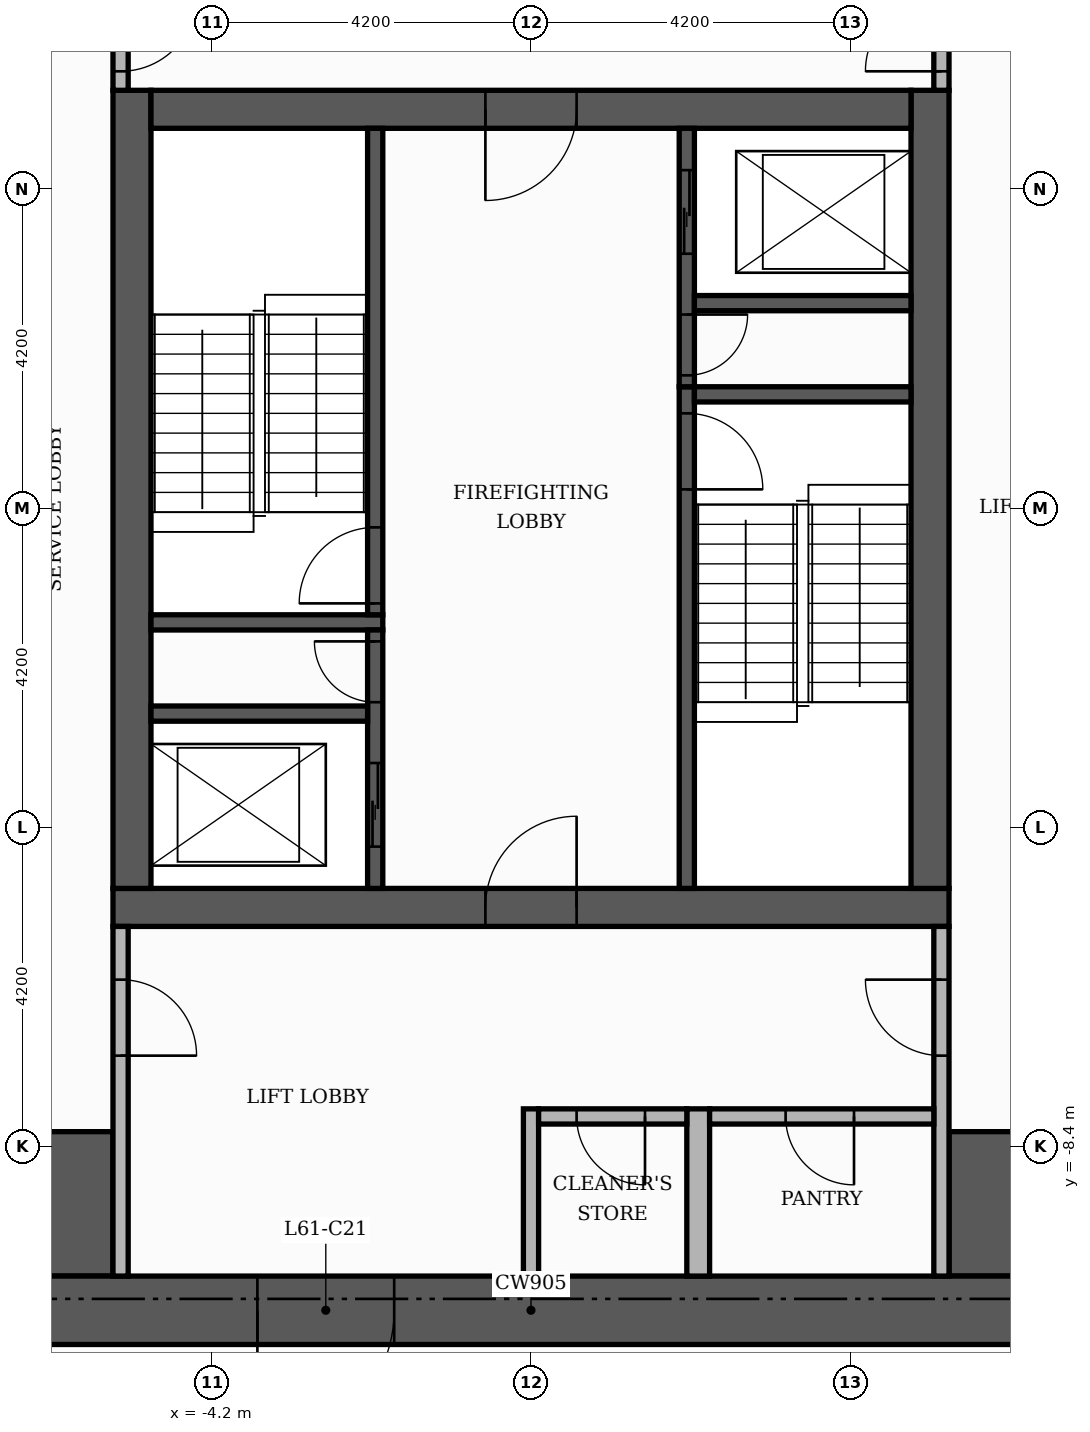
"""IFC4 building model, lengths in metres.
Left out: names, types, materials, properties, quantities, classifications, styles, units other than length and angle.
Written with IfcOpenShell. Run it as: python <this file> out.ifc"""

import sys

from ifc_helpers import new_model, si_unit, direction, frame, frame_2d, origin, place, context, subcontext, project, spatial, rectangle, extrude, element, fill, save


model = new_model("IFC4")
c1 = context("Model", 3, precision=1e-05, world=origin(), true_north=direction((0.0, 1.0)))
c2 = subcontext(c1, "Body", "Model", "MODEL_VIEW")
j1 = project(units=[si_unit("LENGTHUNIT", "METRE"), si_unit("PLANEANGLEUNIT", "RADIAN")], contexts=[c1])
p1 = place(None, origin())
s1 = spatial("IfcSite", under=j1, at=p1, CompositionType="ELEMENT")
p2 = place(p1, origin())
s2 = spatial("IfcBuilding", under=s1, at=p2, CompositionType="ELEMENT")
p3 = place(p2, frame((0.0, 0.0, 256.2)))
s3 = spatial("IfcBuildingStorey", under=s2, at=p3, CompositionType="ELEMENT", Elevation=256.2)
p4 = place(p3, frame((-5.5, -5.25, 0.0), z_axis=(0.0, 0.0, 1.0), x_axis=(1.0, 0.0, 0.0)))
e1 = element("IfcWall", 1, at=p4, inside=s3, PredefinedType="SHEAR", context=c2, shape_type="SweptSolid", body=[
    extrude(rectangle(XDim=11.0, YDim=0.5, at=frame_2d((5.5, 0.0))), origin(), (0.0, 0.0, 1.0), 3.48),
])
p5 = place(p4, frame((4.9, 0.0, 0.0)))
e2 = element("IfcOpeningElement", 2, at=p5, cuts=e1, PredefinedType="OPENING", context=c2, shape_type="SweptSolid", body=[
    extrude(rectangle(XDim=1.2, YDim=2.1, at=frame_2d((0.6, 1.05))), frame((0.0, 0.26, 0.0), z_axis=(0.0, -1.0, 0.0), x_axis=(1.0, 0.0, 0.0)), (0.0, 0.0, 1.0), 0.52),
])
for number, where, z_axis, x_axis in (
    (3, (-5.25, -5.0, 0.0), (0.0, 0.0, 1.0), (0.0, 1.0, 0.0)),
    (4, (5.25, -5.0, 0.0), (0.0, 0.0, 1.0), (0.0, 1.0, 0.0)),
):
    element("IfcWall", number, at=place(p3, frame(where, z_axis=z_axis, x_axis=x_axis)), inside=s3, PredefinedType="SHEAR", context=c2, shape_type="SweptSolid", body=[
        extrude(rectangle(XDim=10.5, YDim=0.5, at=frame_2d((5.25, 0.0))), origin(), (0.0, 0.0, 1.0), 3.48),
    ])
p6 = place(p3, frame((-5.0, 5.25, 0.0), z_axis=(0.0, 0.0, 1.0), x_axis=(1.0, 0.0, 0.0)))
e5 = element("IfcWall", 5, at=p6, inside=s3, PredefinedType="SHEAR", context=c2, shape_type="SweptSolid", body=[
    extrude(rectangle(XDim=10.0, YDim=0.5, at=frame_2d((5.0, 0.0))), origin(), (0.0, 0.0, 1.0), 3.48),
])
p7 = place(p6, frame((4.4, 0.0, 0.0)))
e6 = element("IfcOpeningElement", 6, at=p7, cuts=e5, PredefinedType="OPENING", context=c2, shape_type="SweptSolid", body=[
    extrude(rectangle(XDim=1.2, YDim=2.1, at=frame_2d((0.6, 1.05))), frame((0.0, 0.26, 0.0), z_axis=(0.0, -1.0, 0.0), x_axis=(1.0, 0.0, 0.0)), (0.0, 0.0, 1.0), 0.52),
])
for number, where, z_axis, x_axis in (
    (7, (-10.1, -9.15, 0.0), (0.0, 0.0, 1.0), (1.0, 0.0, 0.0)),
    (8, (5.5, -9.15, 0.0), (0.0, 0.0, 1.0), (1.0, 0.0, 0.0)),
):
    element("IfcWall", number, at=place(p3, frame(where, z_axis=z_axis, x_axis=x_axis)), inside=s3, PredefinedType="SHEAR", context=c2, shape_type="SweptSolid", body=[
        extrude(rectangle(XDim=4.6, YDim=1.9, at=frame_2d((2.3, 0.0))), origin(), (0.0, 0.0, 1.0), 3.48),
    ])
p8 = place(p3, frame((2.05, -5.0, 0.0), z_axis=(0.0, 0.0, 1.0), x_axis=(0.0, 1.0, 0.0)))
e9 = element("IfcWall", 9, at=p8, inside=s3, PredefinedType="SHEAR", context=c2, shape_type="SweptSolid", body=[
    extrude(rectangle(XDim=6.6, YDim=0.2, at=frame_2d((3.3, 0.0))), origin(), (0.0, 0.0, 1.0), 3.48),
])
p9 = place(p8, frame((5.25, 0.0, 0.0)))
e10 = element("IfcOpeningElement", 10, at=p9, cuts=e9, PredefinedType="OPENING", context=c2, shape_type="SweptSolid", body=[
    extrude(rectangle(XDim=1.0, YDim=2.1, at=frame_2d((0.5, 1.05))), frame((0.0, 0.11, 0.0), z_axis=(0.0, -1.0, 0.0), x_axis=(1.0, 0.0, 0.0)), (0.0, 0.0, 1.0), 0.22),
])
p10 = place(p3, frame((-5.0, -1.5, 0.0), z_axis=(0.0, 0.0, 1.0), x_axis=(1.0, 0.0, 0.0)))
e11 = element("IfcWall", 11, at=p10, inside=s3, PredefinedType="SHEAR", context=c2, shape_type="SweptSolid", body=[
    extrude(rectangle(XDim=3.05, YDim=0.2, at=frame_2d((1.525, 0.0))), origin(), (0.0, 0.0, 1.0), 3.48),
])
p11 = place(p3, frame((-2.05, -1.4, 0.0), z_axis=(0.0, 0.0, 1.0), x_axis=(0.0, 1.0, 0.0)))
e12 = element("IfcWall", 12, at=p11, inside=s3, PredefinedType="SHEAR", context=c2, shape_type="SweptSolid", body=[
    extrude(rectangle(XDim=6.4, YDim=0.2, at=frame_2d((3.2, 0.0))), origin(), (0.0, 0.0, 1.0), 3.48),
])
p12 = place(p11, frame((0.15, 0.0, 0.0)))
e13 = element("IfcOpeningElement", 13, at=p12, cuts=e12, PredefinedType="OPENING", context=c2, shape_type="SweptSolid", body=[
    extrude(rectangle(XDim=1.0, YDim=2.1, at=frame_2d((0.5, 1.05))), frame((0.0, 0.11, 0.0), z_axis=(0.0, -1.0, 0.0), x_axis=(1.0, 0.0, 0.0)), (0.0, 0.0, 1.0), 0.22),
])
p13 = place(p3, frame((2.15, 1.5, 0.0), z_axis=(0.0, 0.0, 1.0), x_axis=(1.0, 0.0, 0.0)))
e14 = element("IfcWall", 14, at=p13, inside=s3, PredefinedType="SHEAR", context=c2, shape_type="SweptSolid", body=[
    extrude(rectangle(XDim=2.85, YDim=0.2, at=frame_2d((1.425, 0.0))), origin(), (0.0, 0.0, 1.0), 3.48),
])
p14 = place(p3, frame((-2.05, -5.0, 0.0), z_axis=(0.0, 0.0, 1.0), x_axis=(0.0, 1.0, 0.0)))
e15 = element("IfcWall", 15, at=p14, inside=s3, PredefinedType="SHEAR", context=c2, shape_type="SweptSolid", body=[
    extrude(rectangle(XDim=3.4, YDim=0.2, at=frame_2d((1.7, 0.0))), origin(), (0.0, 0.0, 1.0), 3.48),
])
p15 = place(p14, frame((0.55, 0.0, 0.0)))
e16 = element("IfcOpeningElement", 16, at=p15, cuts=e15, PredefinedType="OPENING", context=c2, shape_type="SweptSolid", body=[
    extrude(rectangle(XDim=1.1, YDim=2.1, at=frame_2d((0.55, 1.05))), frame((0.0, 0.11, 0.0), z_axis=(0.0, -1.0, 0.0), x_axis=(1.0, 0.0, 0.0)), (0.0, 0.0, 1.0), 0.22),
])
p16 = place(p14, frame((2.45, 0.0, 0.0)))
e17 = element("IfcOpeningElement", 17, at=p16, cuts=e15, PredefinedType="OPENING", context=c2, shape_type="SweptSolid", body=[
    extrude(rectangle(XDim=0.8, YDim=2.1, at=frame_2d((0.4, 1.05))), frame((0.0, 0.11, 0.0), z_axis=(0.0, -1.0, 0.0), x_axis=(1.0, 0.0, 0.0)), (0.0, 0.0, 1.0), 0.22),
])
p17 = place(p3, frame((-5.0, -2.7, 0.0), z_axis=(0.0, 0.0, 1.0), x_axis=(1.0, 0.0, 0.0)))
e18 = element("IfcWall", 18, at=p17, inside=s3, PredefinedType="SHEAR", context=c2, shape_type="SweptSolid", body=[
    extrude(rectangle(XDim=2.85, YDim=0.2, at=frame_2d((1.425, 0.0))), origin(), (0.0, 0.0, 1.0), 3.48),
])
p18 = place(p3, frame((2.05, 1.6, 0.0), z_axis=(0.0, 0.0, 1.0), x_axis=(0.0, 1.0, 0.0)))
e19 = element("IfcWall", 19, at=p18, inside=s3, PredefinedType="SHEAR", context=c2, shape_type="SweptSolid", body=[
    extrude(rectangle(XDim=3.4, YDim=0.2, at=frame_2d((1.7, 0.0))), origin(), (0.0, 0.0, 1.0), 3.48),
])
p19 = place(p18, frame((1.75, 0.0, 0.0)))
e20 = element("IfcOpeningElement", 20, at=p19, cuts=e19, PredefinedType="OPENING", context=c2, shape_type="SweptSolid", body=[
    extrude(rectangle(XDim=1.1, YDim=2.1, at=frame_2d((0.55, 1.05))), frame((0.0, 0.11, 0.0), z_axis=(0.0, -1.0, 0.0), x_axis=(1.0, 0.0, 0.0)), (0.0, 0.0, 1.0), 0.22),
])
p20 = place(p18, frame((0.15, 0.0, 0.0)))
e21 = element("IfcOpeningElement", 21, at=p20, cuts=e19, PredefinedType="OPENING", context=c2, shape_type="SweptSolid", body=[
    extrude(rectangle(XDim=0.8, YDim=2.1, at=frame_2d((0.4, 1.05))), frame((0.0, 0.11, 0.0), z_axis=(0.0, -1.0, 0.0), x_axis=(1.0, 0.0, 0.0)), (0.0, 0.0, 1.0), 0.22),
])
p21 = place(p3, frame((2.15, 2.7, 0.0), z_axis=(0.0, 0.0, 1.0), x_axis=(1.0, 0.0, 0.0)))
e22 = element("IfcWall", 22, at=p21, inside=s3, PredefinedType="SHEAR", context=c2, shape_type="SweptSolid", body=[
    extrude(rectangle(XDim=2.85, YDim=0.2, at=frame_2d((1.425, 0.0))), origin(), (0.0, 0.0, 1.0), 3.48),
])
p22 = place(p3, frame((-11.0, -10.55, 0.0), z_axis=(0.0, 0.0, 1.0), x_axis=(1.0, 0.0, 0.0)))
e23 = element("IfcWall", 23, at=p22, inside=s3, PredefinedType="SHEAR", context=c2, shape_type="SweptSolid", body=[
    extrude(rectangle(XDim=22.0, YDim=0.9, at=frame_2d((11.0, 0.0))), origin(), (0.0, 0.0, 1.0), 3.48),
])
p23 = place(p22, frame((7.4, 0.0, 0.0)))
e24 = element("IfcOpeningElement", 24, at=p23, cuts=e23, PredefinedType="OPENING", context=c2, shape_type="SweptSolid", body=[
    extrude(rectangle(XDim=1.8, YDim=2.2, at=frame_2d((0.9, 1.1))), frame((0.0, 0.46, 0.0), z_axis=(0.0, -1.0, 0.0), x_axis=(1.0, 0.0, 0.0)), (0.0, 0.0, 1.0), 0.92),
])
p24 = place(p3, frame((-5.4, -10.1, 0.0), z_axis=(0.0, 0.0, 1.0), x_axis=(0.0, 1.0, 0.0)))
e25 = element("IfcWall", 25, at=p24, inside=s3, PredefinedType="PARTITIONING", context=c2, shape_type="SweptSolid", body=[
    extrude(rectangle(XDim=4.6, YDim=0.2, at=frame_2d((2.3, 0.0))), origin(), (0.0, 0.0, 1.0), 3.48),
])
p25 = place(p24, frame((2.9, 0.0, 0.0)))
e26 = element("IfcOpeningElement", 26, at=p25, cuts=e25, PredefinedType="OPENING", context=c2, shape_type="SweptSolid", body=[
    extrude(rectangle(XDim=1.0, YDim=2.1, at=frame_2d((0.5, 1.05))), frame((0.0, 0.11, 0.0), z_axis=(0.0, -1.0, 0.0), x_axis=(1.0, 0.0, 0.0)), (0.0, 0.0, 1.0), 0.22),
])
p26 = place(p3, frame((0.0, -10.1, 0.0), z_axis=(0.0, 0.0, 1.0), x_axis=(0.0, 1.0, 0.0)))
e27 = element("IfcWall", 27, at=p26, inside=s3, PredefinedType="PARTITIONING", context=c2, shape_type="SweptSolid", body=[
    extrude(rectangle(XDim=2.2, YDim=0.2, at=frame_2d((1.1, 0.0))), origin(), (0.0, 0.0, 1.0), 3.48),
])
p27 = place(p3, frame((2.2, -10.1, 0.0), z_axis=(0.0, 0.0, 1.0), x_axis=(0.0, 1.0, 0.0)))
e28 = element("IfcWall", 28, at=p27, inside=s3, PredefinedType="PARTITIONING", context=c2, shape_type="SweptSolid", body=[
    extrude(rectangle(XDim=2.2, YDim=0.3, at=frame_2d((1.1, 0.0))), origin(), (0.0, 0.0, 1.0), 3.48),
])
p28 = place(p3, frame((5.4, -10.1, 0.0), z_axis=(0.0, 0.0, 1.0), x_axis=(0.0, 1.0, 0.0)))
e29 = element("IfcWall", 29, at=p28, inside=s3, PredefinedType="PARTITIONING", context=c2, shape_type="SweptSolid", body=[
    extrude(rectangle(XDim=4.6, YDim=0.2, at=frame_2d((2.3, 0.0))), origin(), (0.0, 0.0, 1.0), 3.48),
])
p29 = place(p28, frame((2.9, 0.0, 0.0)))
e30 = element("IfcOpeningElement", 30, at=p29, cuts=e29, PredefinedType="OPENING", context=c2, shape_type="SweptSolid", body=[
    extrude(rectangle(XDim=1.0, YDim=2.1, at=frame_2d((0.5, 1.05))), frame((0.0, 0.11, 0.0), z_axis=(0.0, -1.0, 0.0), x_axis=(1.0, 0.0, 0.0)), (0.0, 0.0, 1.0), 0.22),
])
p30 = place(p3, frame((0.1, -8.0, 0.0), z_axis=(0.0, 0.0, 1.0), x_axis=(1.0, 0.0, 0.0)))
e31 = element("IfcWall", 31, at=p30, inside=s3, PredefinedType="PARTITIONING", context=c2, shape_type="SweptSolid", body=[
    extrude(rectangle(XDim=1.95, YDim=0.2, at=frame_2d((0.975, 0.0))), origin(), (0.0, 0.0, 1.0), 3.48),
])
p31 = place(p30, frame((0.5, 0.0, 0.0)))
e32 = element("IfcOpeningElement", 32, at=p31, cuts=e31, PredefinedType="OPENING", context=c2, shape_type="SweptSolid", body=[
    extrude(rectangle(XDim=0.9, YDim=2.1, at=frame_2d((0.45, 1.05))), frame((0.0, 0.11, 0.0), z_axis=(0.0, -1.0, 0.0), x_axis=(1.0, 0.0, 0.0)), (0.0, 0.0, 1.0), 0.22),
])
p32 = place(p3, frame((2.35, -8.0, 0.0), z_axis=(0.0, 0.0, 1.0), x_axis=(1.0, 0.0, 0.0)))
e33 = element("IfcWall", 33, at=p32, inside=s3, PredefinedType="PARTITIONING", context=c2, shape_type="SweptSolid", body=[
    extrude(rectangle(XDim=2.95, YDim=0.2, at=frame_2d((1.475, 0.0))), origin(), (0.0, 0.0, 1.0), 3.48),
])
p33 = place(p32, frame((1.0, 0.0, 0.0)))
e34 = element("IfcOpeningElement", 34, at=p33, cuts=e33, PredefinedType="OPENING", context=c2, shape_type="SweptSolid", body=[
    extrude(rectangle(XDim=0.9, YDim=2.1, at=frame_2d((0.45, 1.05))), frame((0.0, 0.11, 0.0), z_axis=(0.0, -1.0, 0.0), x_axis=(1.0, 0.0, 0.0)), (0.0, 0.0, 1.0), 0.22),
])
p34 = place(p3, frame((-5.4, 5.5, 0.0), z_axis=(0.0, 0.0, 1.0), x_axis=(0.0, 1.0, 0.0)))
e35 = element("IfcWall", 35, at=p34, inside=s3, PredefinedType="PARTITIONING", context=c2, shape_type="SweptSolid", body=[
    extrude(rectangle(XDim=1.55, YDim=0.2, at=frame_2d((0.775, 0.0))), origin(), (0.0, 0.0, 1.0), 3.48),
])
p35 = place(p34, frame((0.25, 0.0, 0.0)))
e36 = element("IfcOpeningElement", 36, at=p35, cuts=e35, PredefinedType="OPENING", context=c2, shape_type="SweptSolid", body=[
    extrude(rectangle(XDim=1.0, YDim=2.1, at=frame_2d((0.5, 1.05))), frame((0.0, 0.11, 0.0), z_axis=(0.0, -1.0, 0.0), x_axis=(1.0, 0.0, 0.0)), (0.0, 0.0, 1.0), 0.22),
])
p36 = place(p3, frame((5.4, 5.5, 0.0), z_axis=(0.0, 0.0, 1.0), x_axis=(0.0, 1.0, 0.0)))
e37 = element("IfcWall", 37, at=p36, inside=s3, PredefinedType="PARTITIONING", context=c2, shape_type="SweptSolid", body=[
    extrude(rectangle(XDim=4.6, YDim=0.2, at=frame_2d((2.3, 0.0))), origin(), (0.0, 0.0, 1.0), 3.48),
])
p37 = place(p36, frame((0.25, 0.0, 0.0)))
e38 = element("IfcOpeningElement", 38, at=p37, cuts=e37, PredefinedType="OPENING", context=c2, shape_type="SweptSolid", body=[
    extrude(rectangle(XDim=1.0, YDim=2.1, at=frame_2d((0.5, 1.05))), frame((0.0, 0.11, 0.0), z_axis=(0.0, -1.0, 0.0), x_axis=(1.0, 0.0, 0.0)), (0.0, 0.0, 1.0), 0.22),
])
p38 = place(p19, origin())
e39 = element("IfcDoor", 39, at=p38, inside=s3, OperationType="SLIDING_TO_LEFT", PredefinedType="DOOR", context=c2, shape_type="SweptSolid", body=[
    extrude(rectangle(XDim=1.1, YDim=2.1, at=frame_2d((0.55, 1.05))), frame((0.0, 0.025, 0.0), z_axis=(0.0, -1.0, 0.0), x_axis=(1.0, 0.0, 0.0)), (0.0, 0.0, 1.0), 0.05),
])
fill(e20, e39)
p39 = place(p15, origin())
e40 = element("IfcDoor", 40, at=p39, inside=s3, OperationType="SLIDING_TO_LEFT", PredefinedType="DOOR", context=c2, shape_type="SweptSolid", body=[
    extrude(rectangle(XDim=1.1, YDim=2.1, at=frame_2d((0.55, 1.05))), frame((0.0, 0.025, 0.0), z_axis=(0.0, -1.0, 0.0), x_axis=(1.0, 0.0, 0.0)), (0.0, 0.0, 1.0), 0.05),
])
fill(e16, e40)
p40 = place(p12, origin())
e41 = element("IfcDoor", 41, at=p40, inside=s3, OperationType="SINGLE_SWING_LEFT", PredefinedType="DOOR", context=c2, shape_type="SweptSolid", body=[
    extrude(rectangle(XDim=1.0, YDim=2.1, at=frame_2d((0.5, 1.05))), frame((0.0, 0.025, 0.0), z_axis=(0.0, -1.0, 0.0), x_axis=(1.0, 0.0, 0.0)), (0.0, 0.0, 1.0), 0.05),
])
fill(e13, e41)
p41 = place(p9, frame((1.0, 0.0, 0.0), z_axis=(0.0, 0.0, 1.0), x_axis=(-1.0, 0.0, 0.0)))
e42 = element("IfcDoor", 42, at=p41, inside=s3, OperationType="SINGLE_SWING_LEFT", PredefinedType="DOOR", context=c2, shape_type="SweptSolid", body=[
    extrude(rectangle(XDim=1.0, YDim=2.1, at=frame_2d((0.5, 1.05))), frame((0.0, 0.025, 0.0), z_axis=(0.0, -1.0, 0.0), x_axis=(1.0, 0.0, 0.0)), (0.0, 0.0, 1.0), 0.05),
])
fill(e10, e42)
p42 = place(p20, frame((0.8, 0.0, 0.0), z_axis=(0.0, 0.0, 1.0), x_axis=(-1.0, 0.0, 0.0)))
e43 = element("IfcDoor", 43, at=p42, inside=s3, OperationType="SINGLE_SWING_RIGHT", PredefinedType="DOOR", context=c2, shape_type="SweptSolid", body=[
    extrude(rectangle(XDim=0.8, YDim=2.1, at=frame_2d((0.4, 1.05))), frame((0.0, 0.025, 0.0), z_axis=(0.0, -1.0, 0.0), x_axis=(1.0, 0.0, 0.0)), (0.0, 0.0, 1.0), 0.05),
])
fill(e21, e43)
p43 = place(p16, origin())
e44 = element("IfcDoor", 44, at=p43, inside=s3, OperationType="SINGLE_SWING_RIGHT", PredefinedType="DOOR", context=c2, shape_type="SweptSolid", body=[
    extrude(rectangle(XDim=0.8, YDim=2.1, at=frame_2d((0.4, 1.05))), frame((0.0, 0.025, 0.0), z_axis=(0.0, -1.0, 0.0), x_axis=(1.0, 0.0, 0.0)), (0.0, 0.0, 1.0), 0.05),
])
fill(e17, e44)
p44 = place(p7, frame((1.2, 0.0, 0.0), z_axis=(0.0, 0.0, 1.0), x_axis=(-1.0, 0.0, 0.0)))
e45 = element("IfcDoor", 45, at=p44, inside=s3, OperationType="SINGLE_SWING_LEFT", PredefinedType="DOOR", context=c2, shape_type="SweptSolid", body=[
    extrude(rectangle(XDim=1.2, YDim=2.1, at=frame_2d((0.6, 1.05))), frame((0.0, 0.025, 0.0), z_axis=(0.0, -1.0, 0.0), x_axis=(1.0, 0.0, 0.0)), (0.0, 0.0, 1.0), 0.05),
])
fill(e6, e45)
p45 = place(p5, origin())
e46 = element("IfcDoor", 46, at=p45, inside=s3, OperationType="SINGLE_SWING_RIGHT", PredefinedType="DOOR", context=c2, shape_type="SweptSolid", body=[
    extrude(rectangle(XDim=1.2, YDim=2.1, at=frame_2d((0.6, 1.05))), frame((0.0, 0.025, 0.0), z_axis=(0.0, -1.0, 0.0), x_axis=(1.0, 0.0, 0.0)), (0.0, 0.0, 1.0), 0.05),
])
fill(e2, e46)
p46 = place(p35, frame((1.0, 0.0, 0.0), z_axis=(0.0, 0.0, 1.0), x_axis=(-1.0, 0.0, 0.0)))
e47 = element("IfcDoor", 47, at=p46, inside=s3, OperationType="SINGLE_SWING_RIGHT", PredefinedType="DOOR", context=c2, shape_type="SweptSolid", body=[
    extrude(rectangle(XDim=1.0, YDim=2.1, at=frame_2d((0.5, 1.05))), frame((0.0, 0.025, 0.0), z_axis=(0.0, -1.0, 0.0), x_axis=(1.0, 0.0, 0.0)), (0.0, 0.0, 1.0), 0.05),
])
fill(e36, e47)
p47 = place(p37, origin())
e48 = element("IfcDoor", 48, at=p47, inside=s3, OperationType="SINGLE_SWING_LEFT", PredefinedType="DOOR", context=c2, shape_type="SweptSolid", body=[
    extrude(rectangle(XDim=1.0, YDim=2.1, at=frame_2d((0.5, 1.05))), frame((0.0, 0.025, 0.0), z_axis=(0.0, -1.0, 0.0), x_axis=(1.0, 0.0, 0.0)), (0.0, 0.0, 1.0), 0.05),
])
fill(e38, e48)
p48 = place(p25, frame((1.0, 0.0, 0.0), z_axis=(0.0, 0.0, 1.0), x_axis=(-1.0, 0.0, 0.0)))
e49 = element("IfcDoor", 49, at=p48, inside=s3, OperationType="SINGLE_SWING_LEFT", PredefinedType="DOOR", context=c2, shape_type="SweptSolid", body=[
    extrude(rectangle(XDim=1.0, YDim=2.1, at=frame_2d((0.5, 1.05))), frame((0.0, 0.025, 0.0), z_axis=(0.0, -1.0, 0.0), x_axis=(1.0, 0.0, 0.0)), (0.0, 0.0, 1.0), 0.05),
])
fill(e26, e49)
p49 = place(p29, origin())
e50 = element("IfcDoor", 50, at=p49, inside=s3, OperationType="SINGLE_SWING_RIGHT", PredefinedType="DOOR", context=c2, shape_type="SweptSolid", body=[
    extrude(rectangle(XDim=1.0, YDim=2.1, at=frame_2d((0.5, 1.05))), frame((0.0, 0.025, 0.0), z_axis=(0.0, -1.0, 0.0), x_axis=(1.0, 0.0, 0.0)), (0.0, 0.0, 1.0), 0.05),
])
fill(e30, e50)
p50 = place(p23, frame((1.8, 0.0, 0.0), z_axis=(0.0, 0.0, 1.0), x_axis=(-1.0, 0.0, 0.0)))
e51 = element("IfcDoor", 51, at=p50, inside=s3, OperationType="DOUBLE_DOOR_SINGLE_SWING", PredefinedType="DOOR", context=c2, shape_type="SweptSolid", body=[
    extrude(rectangle(XDim=1.8, YDim=2.2, at=frame_2d((0.9, 1.1))), frame((0.0, 0.025, 0.0), z_axis=(0.0, -1.0, 0.0), x_axis=(1.0, 0.0, 0.0)), (0.0, 0.0, 1.0), 0.05),
])
fill(e24, e51)
p51 = place(p31, frame((0.9, 0.0, 0.0), z_axis=(0.0, 0.0, 1.0), x_axis=(-1.0, 0.0, 0.0)))
e52 = element("IfcDoor", 52, at=p51, inside=s3, OperationType="SINGLE_SWING_RIGHT", PredefinedType="DOOR", context=c2, shape_type="SweptSolid", body=[
    extrude(rectangle(XDim=0.9, YDim=2.1, at=frame_2d((0.45, 1.05))), frame((0.0, 0.025, 0.0), z_axis=(0.0, -1.0, 0.0), x_axis=(1.0, 0.0, 0.0)), (0.0, 0.0, 1.0), 0.05),
])
fill(e32, e52)
p52 = place(p33, frame((0.9, 0.0, 0.0), z_axis=(0.0, 0.0, 1.0), x_axis=(-1.0, 0.0, 0.0)))
e53 = element("IfcDoor", 53, at=p52, inside=s3, OperationType="SINGLE_SWING_RIGHT", PredefinedType="DOOR", context=c2, shape_type="SweptSolid", body=[
    extrude(rectangle(XDim=0.9, YDim=2.1, at=frame_2d((0.45, 1.05))), frame((0.0, 0.025, 0.0), z_axis=(0.0, -1.0, 0.0), x_axis=(1.0, 0.0, 0.0)), (0.0, 0.0, 1.0), 0.05),
])
fill(e34, e53)
save(model, sys.argv[1])
